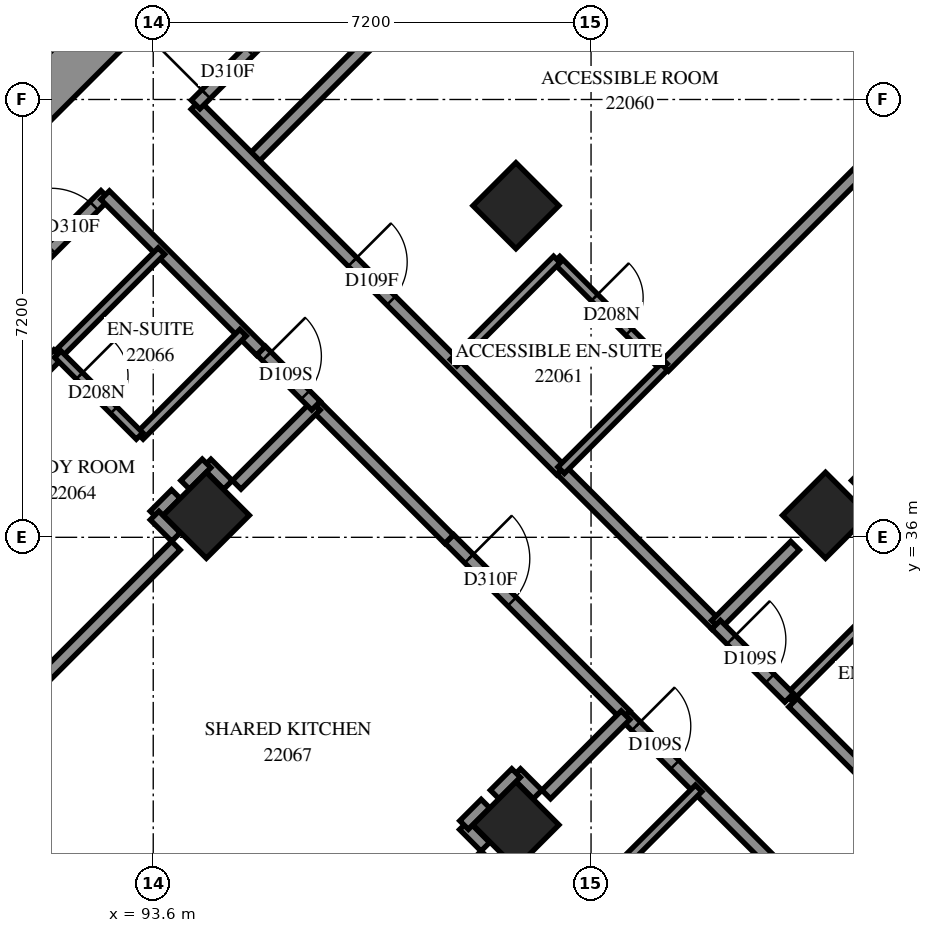
"""IFC4 building model, lengths in metres.
Left out: names, types, materials, properties, quantities, classifications, styles, units other than length and angle.
Written with IfcOpenShell. Run it as: python <this file> out.ifc"""

import sys

from ifc_helpers import new_model, si_unit, direction, frame, frame_2d, origin, origin_2d, place, context, subcontext, project, spatial, rectangle, extrude, element, fill, save


model = new_model("IFC4")
c1 = context("Model", 3, precision=1e-05, world=origin(), true_north=direction((0.0, 1.0)))
c2 = subcontext(c1, "Body", "Model", "MODEL_VIEW")
j1 = project(units=[si_unit("LENGTHUNIT", "METRE"), si_unit("PLANEANGLEUNIT", "RADIAN")], contexts=[c1])
p1 = place(None, origin())
s1 = spatial("IfcSite", under=j1, at=p1, CompositionType="ELEMENT")
p2 = place(p1, origin())
s2 = spatial("IfcBuilding", under=s1, at=p2, CompositionType="ELEMENT")
p3 = place(p2, frame((0.0, 0.0, 84.6)))
s3 = spatial("IfcBuildingStorey", under=s2, at=p3, CompositionType="ELEMENT", Elevation=84.6)
for number, where, z_axis, x_axis in (
    (1, (99.565, 41.453, 0.0), (0.0, 0.0, 1.0), (0.707, -0.707, 0.0)),
    (2, (94.474, 36.362, 0.0), (0.0, 0.0, 1.0), (0.707, -0.707, 0.0)),
    (3, (104.656, 36.362, 0.0), (0.0, 0.0, 1.0), (0.707, -0.707, 0.0)),
    (4, (99.565, 31.271, 0.0), (0.0, 0.0, 1.0), (0.707, -0.707, 0.0)),
):
    element("IfcColumn", number, at=place(p3, frame(where, z_axis=z_axis, x_axis=x_axis)), inside=s3, PredefinedType="COLUMN", context=c2, shape_type="SweptSolid", body=[
        extrude(rectangle(XDim=1.0, YDim=1.0, at=origin_2d()), origin(), (0.0, 0.0, 1.0), 3.1),
    ])
p4 = place(p3, frame((87.12, 38.625, -0.3), z_axis=(0.0, 0.0, 1.0), x_axis=(0.7071067812, 0.7071067812, 0.0)))
e5 = element("IfcWall", 5, at=p4, inside=s3, PredefinedType="SHEAR", context=c2, shape_type="SweptSolid", body=[
    extrude(rectangle(XDim=14.4, YDim=0.8, at=frame_2d((7.2, 0.0))), origin(), (0.0, 0.0, 1.0), 2.7),
])
p5 = place(p4, frame((4.55, 0.0, 0.3)))
e6 = element("IfcOpeningElement", 6, at=p5, cuts=e5, PredefinedType="OPENING", context=c2, shape_type="SweptSolid", body=[
    extrude(rectangle(XDim=1.1, YDim=2.1, at=frame_2d((0.55, 1.05))), frame((0.0, 0.41, 0.0), z_axis=(0.0, -1.0, 0.0), x_axis=(1.0, 0.0, 0.0)), (0.0, 0.0, 1.0), 0.82),
])
p6 = place(p4, frame((11.35, 0.0, 0.3)))
e7 = element("IfcOpeningElement", 7, at=p6, cuts=e5, PredefinedType="OPENING", context=c2, shape_type="SweptSolid", body=[
    extrude(rectangle(XDim=1.1, YDim=2.1, at=frame_2d((0.55, 1.05))), frame((0.0, 0.41, 0.0), z_axis=(0.0, -1.0, 0.0), x_axis=(1.0, 0.0, 0.0)), (0.0, 0.0, 1.0), 0.82),
])
p7 = place(p3, frame((95.215, 42.197, 0.0), z_axis=(0.0, 0.0, 1.0), x_axis=(0.7071114753, 0.7071020871, 0.0)))
e8 = element("IfcWall", 8, at=p7, inside=s3, PredefinedType="PARTITIONING", context=c2, shape_type="SweptSolid", body=[
    extrude(rectangle(XDim=10.652, YDim=0.2, at=frame_2d((5.326, 0.0))), origin(), (0.0, 0.0, 1.0), 3.1),
])
p8 = place(p3, frame((94.294, 43.111, 0.0), z_axis=(0.0, 0.0, 1.0), x_axis=(0.7071067812, -0.7071067812, 0.0)))
e9 = element("IfcWall", 9, at=p8, inside=s3, PredefinedType="PARTITIONING", context=c2, shape_type="SweptSolid", body=[
    extrude(rectangle(XDim=8.499, YDim=0.2, at=frame_2d((4.25, 0.0))), origin(), (0.0, 0.0, 1.0), 3.1),
])
p9 = place(p8, frame((3.651, 0.0, 0.0)))
e10 = element("IfcOpeningElement", 10, at=p9, cuts=e9, PredefinedType="OPENING", context=c2, shape_type="SweptSolid", body=[
    extrude(rectangle(XDim=0.9, YDim=2.1, at=frame_2d((0.45, 1.05))), frame((0.0, 0.11, 0.0), z_axis=(0.0, -1.0, 0.0), x_axis=(1.0, 0.0, 0.0)), (0.0, 0.0, 1.0), 0.22),
])
p10 = place(p3, frame((86.835, 35.655, 0.0), z_axis=(0.0, 0.0, 1.0), x_axis=(0.7071067812, 0.7071067812, 0.0)))
e11 = element("IfcWall", 11, at=p10, inside=s3, PredefinedType="PARTITIONING", context=c2, shape_type="SweptSolid", body=[
    extrude(rectangle(XDim=8.451, YDim=0.2, at=frame_2d((4.226, 0.0))), origin(), (0.0, 0.0, 1.0), 3.1),
])
p11 = place(p10, frame((7.192, 0.0, 0.0)))
e12 = element("IfcOpeningElement", 12, at=p11, cuts=e11, PredefinedType="OPENING", context=c2, shape_type="SweptSolid", body=[
    extrude(rectangle(XDim=1.0, YDim=2.1, at=frame_2d((0.5, 1.05))), frame((0.0, 0.11, 0.0), z_axis=(0.0, -1.0, 0.0), x_axis=(1.0, 0.0, 0.0)), (0.0, 0.0, 1.0), 0.22),
])
p12 = place(p3, frame((94.297, 43.117, 0.0), z_axis=(0.0, 0.0, 1.0), x_axis=(0.7071067812, 0.7071067812, 0.0)))
e13 = element("IfcWall", 13, at=p12, inside=s3, PredefinedType="PARTITIONING", context=c2, shape_type="SweptSolid", body=[
    extrude(rectangle(XDim=8.448, YDim=0.2, at=frame_2d((4.224, 0.0))), origin(), (0.0, 0.0, 1.0), 3.1),
])
p13 = place(p12, frame((0.242, 0.0, 0.0)))
e14 = element("IfcOpeningElement", 14, at=p13, cuts=e13, PredefinedType="OPENING", context=c2, shape_type="SweptSolid", body=[
    extrude(rectangle(XDim=1.0, YDim=2.1, at=frame_2d((0.5, 1.05))), frame((0.0, 0.11, 0.0), z_axis=(0.0, -1.0, 0.0), x_axis=(1.0, 0.0, 0.0)), (0.0, 0.0, 1.0), 0.22),
])
p14 = place(p3, frame((102.002, 38.804, 0.0), z_axis=(0.0, 0.0, 1.0), x_axis=(0.7072394704, 0.7069740671, 0.0)))
e15 = element("IfcWall", 15, at=p14, inside=s3, PredefinedType="PARTITIONING", context=c2, shape_type="SweptSolid", body=[
    extrude(rectangle(XDim=8.289, YDim=0.2, at=frame_2d((4.145, 0.0))), origin(), (0.0, 0.0, 1.0), 3.1),
])
p15 = place(p3, frame((86.349, 33.323, 0.0), z_axis=(0.0, 0.0, 1.0), x_axis=(0.7069824569, 0.7072310836, 0.0)))
e16 = element("IfcWall", 16, at=p15, inside=s3, PredefinedType="PARTITIONING", context=c2, shape_type="SweptSolid", body=[
    extrude(rectangle(XDim=8.044, YDim=0.2, at=frame_2d((4.022, 0.0))), origin(), (0.0, 0.0, 1.0), 3.1),
])
p16 = place(p3, frame((101.365, 33.071, 0.0), z_axis=(0.0, 0.0, 1.0), x_axis=(0.7071067812, -0.7071067812, 0.0)))
e17 = element("IfcWall", 17, at=p16, inside=s3, PredefinedType="PARTITIONING", context=c2, shape_type="SweptSolid", body=[
    extrude(rectangle(XDim=7.2, YDim=0.2, at=frame_2d((3.6, 0.0))), origin(), (0.0, 0.0, 1.0), 3.1),
])
p17 = place(p16, frame((0.248, 0.0, 0.0)))
e18 = element("IfcOpeningElement", 18, at=p17, cuts=e17, PredefinedType="OPENING", context=c2, shape_type="SweptSolid", body=[
    extrude(rectangle(XDim=0.9, YDim=2.1, at=frame_2d((0.45, 1.05))), frame((0.0, 0.11, 0.0), z_axis=(0.0, -1.0, 0.0), x_axis=(1.0, 0.0, 0.0)), (0.0, 0.0, 1.0), 0.22),
])
p18 = place(p16, frame((5.95, 0.0, 0.0)))
e19 = element("IfcOpeningElement", 19, at=p18, cuts=e17, PredefinedType="OPENING", context=c2, shape_type="SweptSolid", body=[
    extrude(rectangle(XDim=0.9, YDim=2.1, at=frame_2d((0.45, 1.05))), frame((0.0, 0.11, 0.0), z_axis=(0.0, -1.0, 0.0), x_axis=(1.0, 0.0, 0.0)), (0.0, 0.0, 1.0), 0.22),
])
for number, where, z_axis, x_axis in (
    (20, (89.881, 31.771, 0.0), (0.0, 0.0, 1.0), (0.707, 0.707, 0.0)),
    (21, (105.155, 36.863, 0.0), (0.0, 0.0, 1.0), (0.707, 0.707, 0.0)),
):
    element("IfcWall", number, at=place(p3, frame(where, z_axis=z_axis, x_axis=x_axis)), inside=s3, PredefinedType="PARTITIONING", context=c2, shape_type="SweptSolid", body=[
        extrude(rectangle(XDim=5.787, YDim=0.2, at=frame_2d((2.893, 0.0))), origin(), (0.0, 0.0, 1.0), 3.1),
    ])
p19 = place(p3, frame((94.973, 26.681, 0.0), z_axis=(0.0, 0.0, 1.0), x_axis=(0.7071067812, 0.7071067812, 0.0)))
e22 = element("IfcWall", 22, at=p19, inside=s3, PredefinedType="PARTITIONING", context=c2, shape_type="SweptSolid", body=[
    extrude(rectangle(XDim=5.784, YDim=0.2, at=frame_2d((2.892, 0.0))), origin(), (0.0, 0.0, 1.0), 3.1),
])
p20 = place(p3, frame((104.123, 33.282, 0.0), z_axis=(0.0, 0.0, 1.0), x_axis=(0.7071067812, -0.7071067812, 0.0)))
e23 = element("IfcWall", 23, at=p20, inside=s3, PredefinedType="PARTITIONING", context=c2, shape_type="SweptSolid", body=[
    extrude(rectangle(XDim=5.399, YDim=0.2, at=frame_2d((2.7, 0.0))), origin(), (0.0, 0.0, 1.0), 3.1),
])
p21 = place(p20, frame((4.08, 0.0, 0.0)))
e24 = element("IfcOpeningElement", 24, at=p21, cuts=e23, PredefinedType="OPENING", context=c2, shape_type="SweptSolid", body=[
    extrude(rectangle(XDim=0.9, YDim=2.1, at=frame_2d((0.45, 1.05))), frame((0.0, 0.11, 0.0), z_axis=(0.0, -1.0, 0.0), x_axis=(1.0, 0.0, 0.0)), (0.0, 0.0, 1.0), 0.22),
])
p22 = place(p3, frame((98.469, 35.973, 0.0), z_axis=(0.0, 0.0, 1.0), x_axis=(0.7073506531, -0.7068628251, 0.0)))
e25 = element("IfcWall", 25, at=p22, inside=s3, PredefinedType="PARTITIONING", context=c2, shape_type="SweptSolid", body=[
    extrude(rectangle(XDim=4.1, YDim=0.2, at=frame_2d((2.05, 0.0))), origin(), (0.0, 0.0, 1.0), 3.1),
])
p23 = place(p22, frame((0.457, 0.0, 0.0)))
e26 = element("IfcOpeningElement", 26, at=p23, cuts=e25, PredefinedType="OPENING", context=c2, shape_type="SweptSolid", body=[
    extrude(rectangle(XDim=1.0, YDim=2.1, at=frame_2d((0.5, 1.05))), frame((0.0, 0.11, 0.0), z_axis=(0.0, -1.0, 0.0), x_axis=(1.0, 0.0, 0.0)), (0.0, 0.0, 1.0), 0.22),
])
p24 = place(p3, frame((92.809, 41.627, 0.0), z_axis=(0.0, 0.0, 1.0), x_axis=(0.7071067812, -0.7071067812, 0.0)))
e27 = element("IfcWall", 27, at=p24, inside=s3, PredefinedType="PARTITIONING", context=c2, shape_type="SweptSolid", body=[
    extrude(rectangle(XDim=3.623, YDim=0.2, at=frame_2d((1.812, 0.0))), origin(), (0.0, 0.0, 1.0), 3.1),
])
p25 = place(p3, frame((100.31, 37.106, 0.0), z_axis=(0.0, 0.0, 1.0), x_axis=(0.7073845681, -0.7068288851, 0.0)))
e28 = element("IfcWall", 28, at=p25, inside=s3, PredefinedType="PARTITIONING", context=c2, shape_type="SweptSolid", body=[
    extrude(rectangle(XDim=3.599, YDim=0.2, at=frame_2d((1.8, 0.0))), origin(), (0.0, 0.0, 1.0), 3.1),
])
p26 = place(p3, frame((96.274, 38.162, 0.0), z_axis=(0.0, 0.0, 1.0), x_axis=(0.7071067812, -0.7071067812, 0.0)))
e29 = element("IfcWall", 29, at=p26, inside=s3, PredefinedType="PARTITIONING", context=c2, shape_type="SweptSolid", body=[
    extrude(rectangle(XDim=3.1, YDim=0.2, at=frame_2d((1.55, 0.0))), origin(), (0.0, 0.0, 1.0), 3.1),
])
p27 = place(p3, frame((100.233, 40.567, 0.0), z_axis=(0.0, 0.0, 1.0), x_axis=(0.7071067812, -0.7071067812, 0.0)))
e30 = element("IfcWall", 30, at=p27, inside=s3, PredefinedType="PARTITIONING", context=c2, shape_type="SweptSolid", body=[
    extrude(rectangle(XDim=2.5, YDim=0.15, at=frame_2d((1.25, 0.0))), origin(), (0.0, 0.0, 1.0), 3.1),
])
p28 = place(p27, frame((0.883, 0.0, 0.0)))
e31 = element("IfcOpeningElement", 31, at=p28, cuts=e30, PredefinedType="OPENING", context=c2, shape_type="SweptSolid", body=[
    extrude(rectangle(XDim=0.8, YDim=2.1, at=frame_2d((0.4, 1.05))), frame((0.0, 0.085, 0.0), z_axis=(0.0, -1.0, 0.0), x_axis=(1.0, 0.0, 0.0)), (0.0, 0.0, 1.0), 0.17),
])
p29 = place(p3, frame((100.871, 30.175, 0.0), z_axis=(0.0, 0.0, 1.0), x_axis=(0.7071067812, 0.7071067812, 0.0)))
e32 = element("IfcWall", 32, at=p29, inside=s3, PredefinedType="PARTITIONING", context=c2, shape_type="SweptSolid", body=[
    extrude(rectangle(XDim=2.401, YDim=0.15, at=frame_2d((1.201, 0.0))), origin(), (0.0, 0.0, 1.0), 3.1),
])
for number, where, z_axis, x_axis in (
    (33, (92.037, 39.011, 0.0), (0.0, 0.0, 1.0), (0.708, 0.707, 0.0)),
    (34, (93.381, 37.667, 0.0), (0.0, 0.0, 1.0), (0.707, 0.708, 0.0)),
    (35, (98.541, 38.871, 0.0), (0.0, 0.0, 1.0), (0.707, 0.708, 0.0)),
    (36, (100.308, 37.103, 0.0), (0.0, 0.0, 1.0), (0.707, 0.708, 0.0)),
):
    element("IfcWall", number, at=place(p3, frame(where, z_axis=z_axis, x_axis=x_axis)), inside=s3, PredefinedType="PARTITIONING", context=c2, shape_type="SweptSolid", body=[
        extrude(rectangle(XDim=2.4, YDim=0.15, at=frame_2d((1.2, 0.0))), origin(), (0.0, 0.0, 1.0), 3.1),
    ])
p30 = place(p3, frame((104.055, 33.359, 0.0), z_axis=(0.0, 0.0, 1.0), x_axis=(0.7071067812, 0.7071067812, 0.0)))
e37 = element("IfcWall", 37, at=p30, inside=s3, PredefinedType="PARTITIONING", context=c2, shape_type="SweptSolid", body=[
    extrude(rectangle(XDim=2.398, YDim=0.15, at=frame_2d((1.199, 0.0))), origin(), (0.0, 0.0, 1.0), 3.1),
])
p31 = place(p3, frame((92.031, 39.011, 0.0), z_axis=(0.0, 0.0, 1.0), x_axis=(0.7071067812, -0.7071067812, 0.0)))
e38 = element("IfcWall", 38, at=p31, inside=s3, PredefinedType="PARTITIONING", context=c2, shape_type="SweptSolid", body=[
    extrude(rectangle(XDim=1.901, YDim=0.15, at=frame_2d((0.95, 0.0))), origin(), (0.0, 0.0, 1.0), 3.1),
])
p32 = place(p31, frame((0.502, 0.0, 0.0)))
e39 = element("IfcOpeningElement", 39, at=p32, cuts=e38, PredefinedType="OPENING", context=c2, shape_type="SweptSolid", body=[
    extrude(rectangle(XDim=0.8, YDim=2.1, at=frame_2d((0.4, 1.05))), frame((0.0, 0.085, 0.0), z_axis=(0.0, -1.0, 0.0), x_axis=(1.0, 0.0, 0.0)), (0.0, 0.0, 1.0), 0.17),
])
p33 = place(p3, frame((100.063, 31.771, 0.0), z_axis=(0.0, 0.0, 1.0), x_axis=(0.7071067812, 0.7071067812, 0.0)))
e40 = element("IfcWall", 40, at=p33, inside=s3, PredefinedType="PARTITIONING", context=c2, shape_type="SweptSolid", body=[
    extrude(rectangle(XDim=1.844, YDim=0.2, at=frame_2d((0.922, 0.0))), origin(), (0.0, 0.0, 1.0), 3.1),
])
for number, where, z_axis, x_axis in (
    (41, (94.973, 36.863, 0.0), (0.0, 0.0, 1.0), (0.707, 0.707, 0.0)),
    (42, (102.853, 34.561, 0.0), (0.0, 0.0, 1.0), (0.707, 0.707, 0.0)),
):
    element("IfcWall", number, at=place(p3, frame(where, z_axis=z_axis, x_axis=x_axis)), inside=s3, PredefinedType="PARTITIONING", context=c2, shape_type="SweptSolid", body=[
        extrude(rectangle(XDim=1.841, YDim=0.2, at=frame_2d((0.921, 0.0))), origin(), (0.0, 0.0, 1.0), 3.1),
    ])
p34 = place(p3, frame((102.857, 34.563, 0.0), z_axis=(0.0, 0.0, 1.0), x_axis=(0.7071067812, -0.7071067812, 0.0)))
e43 = element("IfcWall", 43, at=p34, inside=s3, PredefinedType="PARTITIONING", context=c2, shape_type="SweptSolid", body=[
    extrude(rectangle(XDim=1.7, YDim=0.2, at=frame_2d((0.85, 0.0))), origin(), (0.0, 0.0, 1.0), 3.1),
])
p35 = place(p34, frame((0.35, 0.0, 0.0)))
e44 = element("IfcOpeningElement", 44, at=p35, cuts=e43, PredefinedType="OPENING", context=c2, shape_type="SweptSolid", body=[
    extrude(rectangle(XDim=0.9, YDim=2.1, at=frame_2d((0.45, 1.05))), frame((0.0, 0.11, 0.0), z_axis=(0.0, -1.0, 0.0), x_axis=(1.0, 0.0, 0.0)), (0.0, 0.0, 1.0), 0.22),
])
p36 = place(p3, frame((95.375, 39.069, 0.0), z_axis=(0.0, 0.0, 1.0), x_axis=(0.7063232841, -0.7078894111, 0.0)))
e45 = element("IfcWall", 45, at=p36, inside=s3, PredefinedType="PARTITIONING", context=c2, shape_type="SweptSolid", body=[
    extrude(rectangle(XDim=1.277, YDim=0.2, at=frame_2d((0.638, 0.0))), origin(), (0.0, 0.0, 1.0), 3.1),
])
p37 = place(p36, frame((0.129, 0.0, 0.0)))
e46 = element("IfcOpeningElement", 46, at=p37, cuts=e45, PredefinedType="OPENING", context=c2, shape_type="SweptSolid", body=[
    extrude(rectangle(XDim=0.9, YDim=2.1, at=frame_2d((0.45, 1.05))), frame((0.0, 0.11, 0.0), z_axis=(0.0, -1.0, 0.0), x_axis=(1.0, 0.0, 0.0)), (0.0, 0.0, 1.0), 0.22),
])
p38 = place(p3, frame((98.709, 31.265, 0.0), z_axis=(0.0, 0.0, 1.0), x_axis=(0.7051008166, -0.7091070712, 0.0)))
e47 = element("IfcWall", 47, at=p38, inside=s3, PredefinedType="PARTITIONING", context=c2, shape_type="SweptSolid", body=[
    extrude(rectangle(XDim=0.499, YDim=0.2, at=frame_2d((0.25, 0.0))), origin(), (0.0, 0.0, 1.0), 3.1),
])
for number, where, z_axis, x_axis in (
    (48, (99.569, 32.123, 0.0), (0.0, 0.0, 1.0), (0.707, -0.707, 0.0)),
    (49, (93.621, 36.359, 0.0), (0.0, 0.0, 1.0), (0.707, 0.707, 0.0)),
    (50, (99.215, 31.771, 0.0), (0.0, 0.0, 1.0), (0.707, 0.707, 0.0)),
    (51, (94.478, 37.214, 0.0), (0.0, 0.0, 1.0), (0.707, -0.707, 0.0)),
    (52, (94.125, 36.863, 0.0), (0.0, 0.0, 1.0), (0.707, 0.707, 0.0)),
    (53, (98.712, 31.268, 0.0), (0.0, 0.0, 1.0), (0.707, 0.707, 0.0)),
    (54, (93.622, 36.358, 0.0), (0.0, 0.0, 1.0), (0.707, -0.707, 0.0)),
):
    element("IfcWall", number, at=place(p3, frame(where, z_axis=z_axis, x_axis=x_axis)), inside=s3, PredefinedType="PARTITIONING", context=c2, shape_type="SweptSolid", body=[
        extrude(rectangle(XDim=0.498, YDim=0.2, at=frame_2d((0.249, 0.0))), origin(), (0.0, 0.0, 1.0), 3.1),
    ])
p39 = place(p13, origin())
e55 = element("IfcDoor", 55, at=p39, inside=s3, OperationType="SINGLE_SWING_LEFT", PredefinedType="DOOR", context=c2, shape_type="SweptSolid", body=[
    extrude(rectangle(XDim=1.0, YDim=2.1, at=frame_2d((0.5, 1.05))), frame((0.0, 0.025, 0.0), z_axis=(0.0, -1.0, 0.0), x_axis=(1.0, 0.0, 0.0)), (0.0, 0.0, 1.0), 0.05),
])
fill(e14, e55)
p40 = place(p9, origin())
e56 = element("IfcDoor", 56, at=p40, inside=s3, OperationType="SINGLE_SWING_RIGHT", PredefinedType="DOOR", context=c2, shape_type="SweptSolid", body=[
    extrude(rectangle(XDim=0.9, YDim=2.1, at=frame_2d((0.45, 1.05))), frame((0.0, 0.025, 0.0), z_axis=(0.0, -1.0, 0.0), x_axis=(1.0, 0.0, 0.0)), (0.0, 0.0, 1.0), 0.05),
])
fill(e10, e56)
p41 = place(p28, origin())
e57 = element("IfcDoor", 57, at=p41, inside=s3, OperationType="SINGLE_SWING_RIGHT", PredefinedType="DOOR", context=c2, shape_type="SweptSolid", body=[
    extrude(rectangle(XDim=0.8, YDim=2.1, at=frame_2d((0.4, 1.05))), frame((0.0, 0.025, 0.0), z_axis=(0.0, -1.0, 0.0), x_axis=(1.0, 0.0, 0.0)), (0.0, 0.0, 1.0), 0.05),
])
fill(e31, e57)
p42 = place(p35, origin())
e58 = element("IfcDoor", 58, at=p42, inside=s3, OperationType="SINGLE_SWING_LEFT", PredefinedType="DOOR", context=c2, shape_type="SweptSolid", body=[
    extrude(rectangle(XDim=0.9, YDim=2.1, at=frame_2d((0.45, 1.05))), frame((0.0, 0.025, 0.0), z_axis=(0.0, -1.0, 0.0), x_axis=(1.0, 0.0, 0.0)), (0.0, 0.0, 1.0), 0.05),
])
fill(e44, e58)
p43 = place(p11, origin())
e59 = element("IfcDoor", 59, at=p43, inside=s3, OperationType="SINGLE_SWING_RIGHT", PredefinedType="DOOR", context=c2, shape_type="SweptSolid", body=[
    extrude(rectangle(XDim=1.0, YDim=2.1, at=frame_2d((0.5, 1.05))), frame((0.0, 0.025, 0.0), z_axis=(0.0, -1.0, 0.0), x_axis=(1.0, 0.0, 0.0)), (0.0, 0.0, 1.0), 0.05),
])
fill(e12, e59)
p44 = place(p37, origin())
e60 = element("IfcDoor", 60, at=p44, inside=s3, OperationType="SINGLE_SWING_LEFT", PredefinedType="DOOR", context=c2, shape_type="SweptSolid", body=[
    extrude(rectangle(XDim=0.9, YDim=2.1, at=frame_2d((0.45, 1.05))), frame((0.0, 0.025, 0.0), z_axis=(0.0, -1.0, 0.0), x_axis=(1.0, 0.0, 0.0)), (0.0, 0.0, 1.0), 0.05),
])
fill(e46, e60)
p45 = place(p32, origin())
e61 = element("IfcDoor", 61, at=p45, inside=s3, OperationType="SINGLE_SWING_RIGHT", PredefinedType="DOOR", context=c2, shape_type="SweptSolid", body=[
    extrude(rectangle(XDim=0.8, YDim=2.1, at=frame_2d((0.4, 1.05))), frame((0.0, 0.025, 0.0), z_axis=(0.0, -1.0, 0.0), x_axis=(1.0, 0.0, 0.0)), (0.0, 0.0, 1.0), 0.05),
])
fill(e39, e61)
p46 = place(p23, origin())
e62 = element("IfcDoor", 62, at=p46, inside=s3, OperationType="SINGLE_SWING_RIGHT", PredefinedType="DOOR", context=c2, shape_type="SweptSolid", body=[
    extrude(rectangle(XDim=1.0, YDim=2.1, at=frame_2d((0.5, 1.05))), frame((0.0, 0.025, 0.0), z_axis=(0.0, -1.0, 0.0), x_axis=(1.0, 0.0, 0.0)), (0.0, 0.0, 1.0), 0.05),
])
fill(e26, e62)
p47 = place(p17, origin())
e63 = element("IfcDoor", 63, at=p47, inside=s3, OperationType="SINGLE_SWING_RIGHT", PredefinedType="DOOR", context=c2, shape_type="SweptSolid", body=[
    extrude(rectangle(XDim=0.9, YDim=2.1, at=frame_2d((0.45, 1.05))), frame((0.0, 0.025, 0.0), z_axis=(0.0, -1.0, 0.0), x_axis=(1.0, 0.0, 0.0)), (0.0, 0.0, 1.0), 0.05),
])
fill(e18, e63)
save(model, sys.argv[1])
